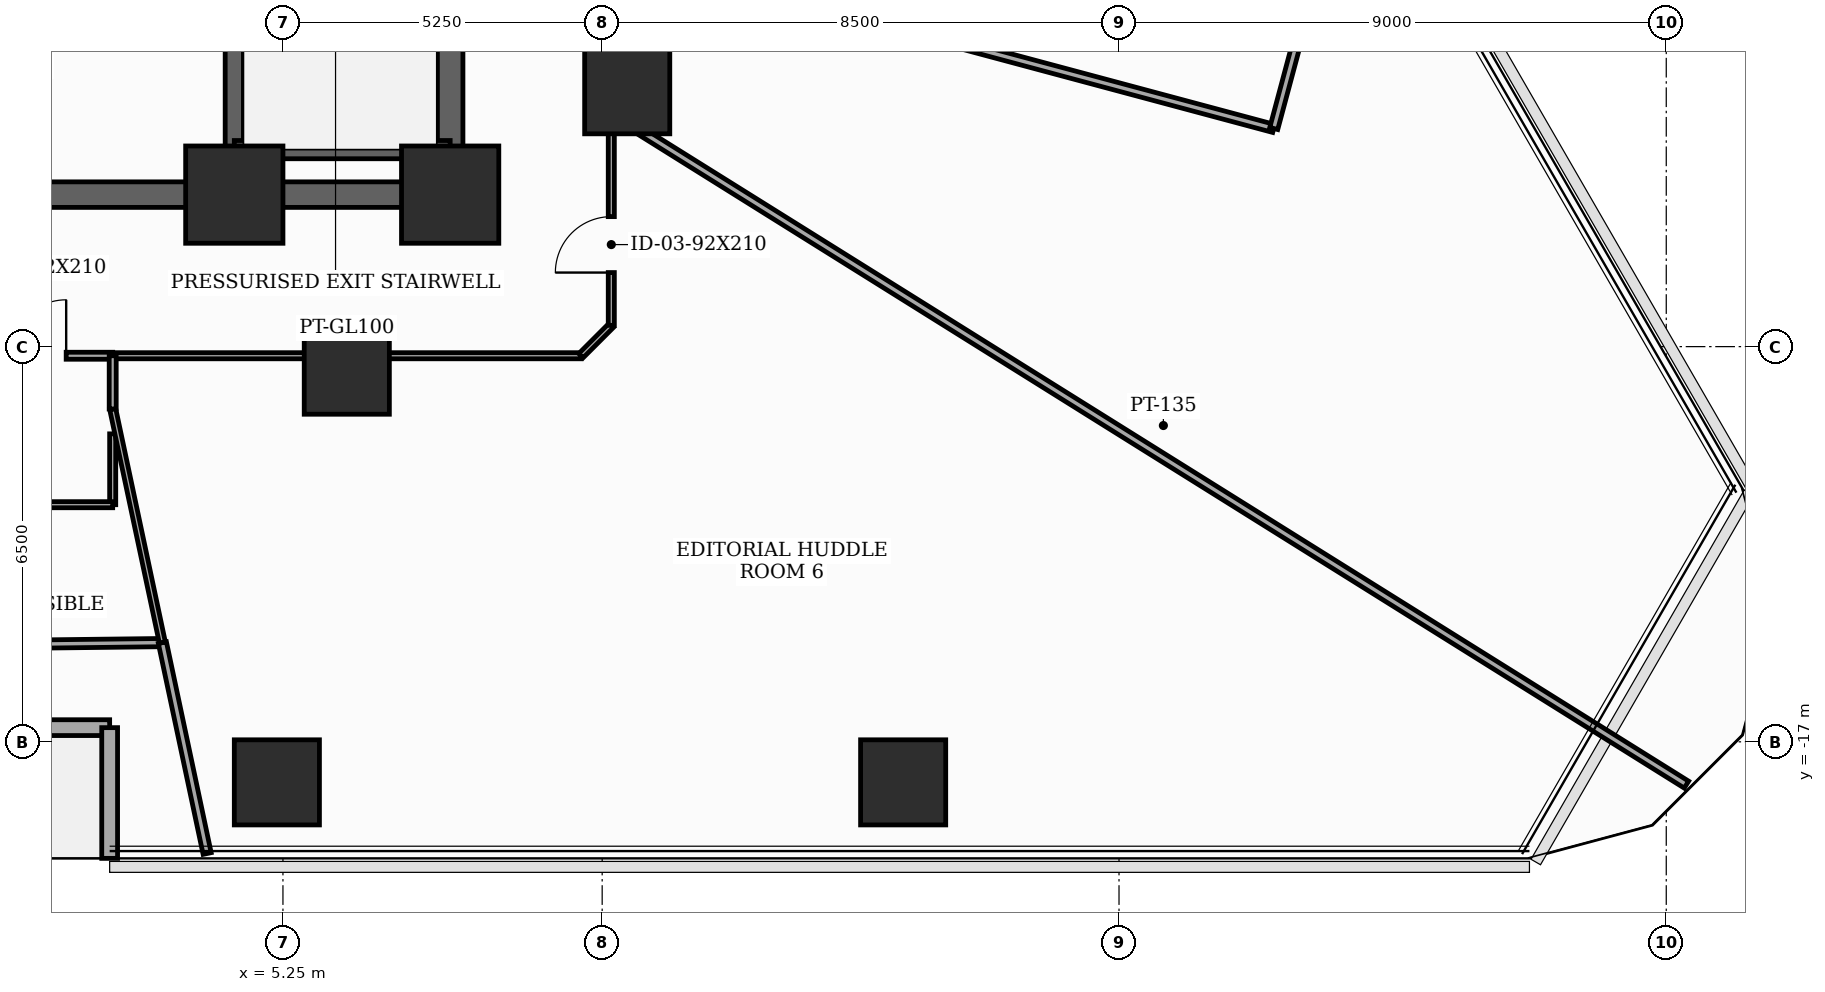
"""IFC4 building model, lengths in metres.
Left out: names, types, materials, properties, quantities, classifications, styles, units other than length and angle.
Written with IfcOpenShell. Run it as: python <this file> out.ifc"""

import sys

from ifc_helpers import new_model, si_unit, direction, frame, frame_2d, origin, origin_2d, place, context, subcontext, project, spatial, rectangle, extrude, element, fill, save


model = new_model("IFC4")
c1 = context("Model", 3, precision=1e-05, world=origin(), true_north=direction((0.0, 1.0)))
c2 = subcontext(c1, "Body", "Model", "MODEL_VIEW")
j1 = project(units=[si_unit("LENGTHUNIT", "METRE"), si_unit("PLANEANGLEUNIT", "RADIAN")], contexts=[c1])
p1 = place(None, origin())
s1 = spatial("IfcSite", under=j1, at=p1, CompositionType="ELEMENT")
p2 = place(p1, origin())
s2 = spatial("IfcBuilding", under=s1, at=p2, CompositionType="ELEMENT")
p3 = place(p2, frame((0.0, 0.0, 29.7)))
s3 = spatial("IfcBuildingStorey", under=s2, at=p3, CompositionType="ELEMENT", Elevation=29.7)
for number, where, z_axis, x_axis in (
    (1, (4.45, -8.0, 0.0), (0.0, 0.0, 1.0), (1.0, 0.0, 0.0)),
    (2, (8.0, -8.0, 0.0), (0.0, 0.0, 1.0), (1.0, 0.0, 0.0)),
):
    element("IfcColumn", number, at=place(p3, frame(where, z_axis=z_axis, x_axis=x_axis)), inside=s3, PredefinedType="COLUMN", context=c2, shape_type="SweptSolid", body=[
        extrude(rectangle(XDim=1.6, YDim=1.6, at=origin_2d()), origin(), (0.0, 0.0, 1.0), 3.7),
    ])
for number, where, z_axis, x_axis in (
    (3, (6.3, -10.912, 0.0), (0.0, 0.0, 1.0), (1.0, 0.0, 0.0)),
    (4, (10.912, -6.3, 0.0), (0.0, 0.0, 1.0), (1.0, 0.0, 0.0)),
    (5, (5.15, -17.667, 0.0), (0.0, 0.0, 1.0), (1.0, 0.0, 0.0)),
    (6, (15.45, -17.667, 0.0), (0.0, 0.0, 1.0), (1.0, 0.0, 0.0)),
):
    element("IfcColumn", number, at=place(p3, frame(where, z_axis=z_axis, x_axis=x_axis)), inside=s3, PredefinedType="COLUMN", context=c2, shape_type="SweptSolid", body=[
        extrude(rectangle(XDim=1.4, YDim=1.4, at=origin_2d()), origin(), (0.0, 0.0, 1.0), 3.7),
    ])
p4 = place(p3, frame((-8.4, -16.767, 0.0), z_axis=(0.0, 0.0, 1.0), x_axis=(1.0, 0.0, 0.0)))
e7 = element("IfcWall", 7, at=p4, inside=s3, PredefinedType="SOLIDWALL", context=c2, shape_type="SweptSolid", body=[
    extrude(rectangle(XDim=10.8, YDim=0.26, at=frame_2d((5.4, 0.0))), origin(), (0.0, 0.0, 1.0), 3.5),
])
p5 = place(p4, frame((7.2, 0.0, 0.0)))
e8 = element("IfcOpeningElement", 8, at=p5, cuts=e7, PredefinedType="OPENING", context=c2, shape_type="SweptSolid", body=[
    extrude(rectangle(XDim=1.6, YDim=2.08, at=frame_2d((0.8, 1.04))), frame((0.0, 0.14, 0.0), z_axis=(0.0, -1.0, 0.0), x_axis=(1.0, 0.0, 0.0)), (0.0, 0.0, 1.0), 0.28),
])
p6 = place(p4, frame((5.65, 0.0, 0.85)))
e9 = element("IfcOpeningElement", 9, at=p6, cuts=e7, PredefinedType="OPENING", context=c2, shape_type="SweptSolid", body=[
    extrude(rectangle(XDim=1.3, YDim=1.25, at=frame_2d((0.65, 0.625))), frame((0.0, 0.14, 0.0), z_axis=(0.0, -1.0, 0.0), x_axis=(1.0, 0.0, 0.0)), (0.0, 0.0, 1.0), 0.28),
])
p7 = place(p3, frame((2.4, -16.767, 0.0), z_axis=(0.0, 0.0, 1.0), x_axis=(0.0, -1.0, 0.0)))
e10 = element("IfcWall", 10, at=p7, inside=s3, PredefinedType="SOLIDWALL", context=c2, shape_type="SweptSolid", body=[
    extrude(rectangle(XDim=2.15, YDim=0.26, at=frame_2d((1.075, 0.0))), origin(), (0.0, 0.0, 1.0), 3.5),
])
p8 = place(p3, frame((8.0, -8.0, 0.0), z_axis=(0.0, 0.0, 1.0), x_axis=(0.0, 1.0, 0.0)))
e11 = element("IfcWall", 11, at=p8, inside=s3, PredefinedType="SHEAR", context=c2, shape_type="SweptSolid", body=[
    extrude(rectangle(XDim=16.0, YDim=0.42, at=frame_2d((8.0, 0.0))), origin(), (0.0, 0.0, 1.0), 3.5),
])
p9 = place(p8, frame((9.6, 0.0, 0.0)))
e12 = element("IfcOpeningElement", 12, at=p9, cuts=e11, PredefinedType="OPENING", context=c2, shape_type="SweptSolid", body=[
    extrude(rectangle(XDim=1.05, YDim=2.15, at=frame_2d((0.525, 1.075))), frame((0.0, 0.22, 0.0), z_axis=(0.0, -1.0, 0.0), x_axis=(1.0, 0.0, 0.0)), (0.0, 0.0, 1.0), 0.44),
])
p10 = place(p8, frame((14.148, 0.0, 0.0)))
e13 = element("IfcOpeningElement", 13, at=p10, cuts=e11, PredefinedType="OPENING", context=c2, shape_type="SweptSolid", body=[
    extrude(rectangle(XDim=0.85, YDim=2.02, at=frame_2d((0.425, 1.01))), frame((0.0, 0.22, 0.0), z_axis=(0.0, -1.0, 0.0), x_axis=(1.0, 0.0, 0.0)), (0.0, 0.0, 1.0), 0.44),
])
p11 = place(p3, frame((-8.0, -8.0, 0.0), z_axis=(0.0, 0.0, 1.0), x_axis=(1.0, 0.0, 0.0)))
e14 = element("IfcWall", 14, at=p11, inside=s3, PredefinedType="SHEAR", context=c2, shape_type="SweptSolid", body=[
    extrude(rectangle(XDim=16.0, YDim=0.42, at=frame_2d((8.0, 0.0))), origin(), (0.0, 0.0, 1.0), 3.5),
])
p12 = place(p11, frame((7.52, 0.0, 0.0)))
e15 = element("IfcOpeningElement", 15, at=p12, cuts=e14, PredefinedType="OPENING", context=c2, shape_type="SweptSolid", body=[
    extrude(rectangle(XDim=0.95, YDim=2.1, at=frame_2d((0.475, 1.05))), frame((0.0, 0.22, 0.0), z_axis=(0.0, -1.0, 0.0), x_axis=(1.0, 0.0, 0.0)), (0.0, 0.0, 1.0), 0.44),
])
p13 = place(p3, frame((4.45, -7.79, 0.0), z_axis=(0.0, 0.0, 1.0), x_axis=(0.0, 1.0, 0.0)))
e16 = element("IfcWall", 16, at=p13, inside=s3, PredefinedType="SHEAR", context=c2, shape_type="SweptSolid", body=[
    extrude(rectangle(XDim=15.58, YDim=0.3, at=frame_2d((7.79, 0.0))), origin(), (0.0, 0.0, 1.0), 3.5),
])
p14 = place(p3, frame((4.45, -7.26, 0.0), z_axis=(0.0, 0.0, 1.0), x_axis=(1.0, 0.0, 0.0)))
e17 = element("IfcWall", 17, at=p14, inside=s3, PredefinedType="SHEAR", context=c2, shape_type="SweptSolid", body=[
    extrude(rectangle(XDim=3.55, YDim=0.3, at=frame_2d((1.775, 0.0))), origin(), (0.0, 0.0, 1.0), 3.5),
])
p15 = place(p3, frame((10.65, -6.655, 0.0), z_axis=(0.0, 0.0, 1.0), x_axis=(0.0, 1.0, 0.0)))
e18 = element("IfcWall", 18, at=p15, inside=s3, PredefinedType="PARTITIONING", context=c2, shape_type="SweptSolid", body=[
    extrude(rectangle(XDim=2.663, YDim=0.135, at=frame_2d((1.332, 0.0))), origin(), (0.0, 0.0, 1.0), 2.785),
])
p16 = place(p3, frame((10.65, -3.992, 0.0), z_axis=(0.0, 0.0, 1.0), x_axis=(0.965906888357, -0.258889712088, 0.0)))
e19 = element("IfcWall", 19, at=p16, inside=s3, PredefinedType="PARTITIONING", context=c2, shape_type="SweptSolid", body=[
    extrude(rectangle(XDim=11.28, YDim=0.135, at=frame_2d((5.64, 0.0))), origin(), (0.0, 0.0, 1.0), 2.785),
])
p17 = place(p3, frame((21.545, -6.912, 0.0), z_axis=(0.0, 0.0, 1.0), x_axis=(0.259105843213, 0.965848933329, 0.0)))
e20 = element("IfcWall", 20, at=p17, inside=s3, PredefinedType="PARTITIONING", context=c2, shape_type="SweptSolid", body=[
    extrude(rectangle(XDim=2.2, YDim=0.135, at=frame_2d((1.1, 0.0))), origin(), (0.0, 0.0, 1.0), 2.935),
])
p18 = place(p3, frame((0.0, -10.65, 0.0), z_axis=(0.0, 0.0, 1.0), x_axis=(1.0, 0.0, 0.0)))
e21 = element("IfcWall", 21, at=p18, inside=s3, PredefinedType="PARTITIONING", context=c2, shape_type="SweptSolid", body=[
    extrude(rectangle(XDim=2.45, YDim=0.115, at=frame_2d((1.225, 0.0))), origin(), (0.0, 0.0, 1.0), 3.5),
])
p19 = place(p18, frame((0.765, 0.0, 0.0)))
e22 = element("IfcOpeningElement", 22, at=p19, cuts=e21, PredefinedType="OPENING", context=c2, shape_type="SweptSolid", body=[
    extrude(rectangle(XDim=0.92, YDim=2.1, at=frame_2d((0.46, 1.05))), frame((0.0, 0.067, 0.0), z_axis=(0.0, -1.0, 0.0), x_axis=(1.0, 0.0, 0.0)), (0.0, 0.0, 1.0), 0.135),
])
p20 = place(p3, frame((2.45, -10.65, 0.0), z_axis=(0.0, 0.0, 1.0), x_axis=(1.0, 0.0, 0.0)))
e23 = element("IfcWall", 23, at=p20, inside=s3, PredefinedType="MOVABLE", context=c2, shape_type="SweptSolid", body=[
    extrude(rectangle(XDim=7.7, YDim=0.1, at=frame_2d((3.85, 0.0))), origin(), (0.0, 0.0, 1.0), 2.785),
])
p21 = place(p3, frame((10.15, -10.65, 0.0), z_axis=(0.0, 0.0, 1.0), x_axis=(0.707106781187, 0.707106781187, 0.0)))
e24 = element("IfcWall", 24, at=p21, inside=s3, PredefinedType="MOVABLE", context=c2, shape_type="SweptSolid", body=[
    extrude(rectangle(XDim=0.707, YDim=0.1, at=frame_2d((0.354, 0.0))), origin(), (0.0, 0.0, 1.0), 3.5),
])
p22 = place(p3, frame((10.65, -10.15, 0.0), z_axis=(0.0, 0.0, 1.0), x_axis=(0.0, 1.0, 0.0)))
e25 = element("IfcWall", 25, at=p22, inside=s3, PredefinedType="MOVABLE", context=c2, shape_type="SweptSolid", body=[
    extrude(rectangle(XDim=3.495, YDim=0.1, at=frame_2d((1.748, 0.0))), origin(), (0.0, 0.0, 1.0), 2.785),
])
p23 = place(p22, frame((0.868, 0.0, 0.0)))
e26 = element("IfcOpeningElement", 26, at=p23, cuts=e25, PredefinedType="OPENING", context=c2, shape_type="SweptSolid", body=[
    extrude(rectangle(XDim=0.92, YDim=2.1, at=frame_2d((0.46, 1.05))), frame((0.0, 0.06, 0.0), z_axis=(0.0, -1.0, 0.0), x_axis=(1.0, 0.0, 0.0)), (0.0, 0.0, 1.0), 0.12),
])
p24 = place(p3, frame((10.65, -6.655, 0.0), z_axis=(0.0, 0.0, 1.0), x_axis=(0.848052240981, -0.529912631069, 0.0)))
e27 = element("IfcWall", 27, at=p24, inside=s3, PredefinedType="PARTITIONING", context=c2, shape_type="SweptSolid", body=[
    extrude(rectangle(XDim=20.85, YDim=0.135, at=frame_2d((10.425, 0.0))), origin(), (0.0, 0.0, 1.0), 2.785),
])
p25 = place(p3, frame((3.267, -15.368, 0.0), z_axis=(0.0, 0.0, 1.0), x_axis=(-0.999931630146, -0.011693375588, 0.0)))
e28 = element("IfcWall", 28, at=p25, inside=s3, PredefinedType="PARTITIONING", context=c2, shape_type="SweptSolid", body=[
    extrude(rectangle(XDim=6.598, YDim=0.135, at=frame_2d((3.299, 0.0))), origin(), (0.0, 0.0, 1.0), 3.5),
])
p26 = place(p3, frame((4.003, -18.837, 0.0), z_axis=(0.0, 0.0, 1.0), x_axis=(-0.207633969896, 0.978206590933, 0.0)))
e29 = element("IfcWall", 29, at=p26, inside=s3, PredefinedType="PARTITIONING", context=c2, shape_type="SweptSolid", body=[
    extrude(rectangle(XDim=3.546, YDim=0.135, at=frame_2d((1.773, 0.0))), origin(), (0.0, 0.0, 1.0), 2.935),
])
p27 = place(p3, frame((2.45, -11.935, 0.0), z_axis=(0.0, 0.0, 1.0), x_axis=(0.0, -1.0, 0.0)))
e30 = element("IfcWall", 30, at=p27, inside=s3, PredefinedType="MOVABLE", context=c2, shape_type="SweptSolid", body=[
    extrude(rectangle(XDim=1.166, YDim=0.1, at=frame_2d((0.583, 0.0))), origin(), (0.0, 0.0, 1.0), 2.785),
])
p28 = place(p3, frame((2.45, -13.1, 0.0), z_axis=(0.0, 0.0, 1.0), x_axis=(-1.0, 0.0, 0.0)))
e31 = element("IfcWall", 31, at=p28, inside=s3, PredefinedType="MOVABLE", context=c2, shape_type="SweptSolid", body=[
    extrude(rectangle(XDim=2.45, YDim=0.1, at=frame_2d((1.225, 0.0))), origin(), (0.0, 0.0, 1.0), 3.5),
])
p29 = place(p3, frame((3.267, -15.368, 0.0), z_axis=(0.0, 0.0, 1.0), x_axis=(-0.208030469109, 0.978122346091, 0.0)))
e32 = element("IfcWall", 32, at=p29, inside=s3, PredefinedType="MOVABLE", context=c2, shape_type="SweptSolid", body=[
    extrude(rectangle(XDim=3.928, YDim=0.1, at=frame_2d((1.964, 0.0))), origin(), (0.0, 0.0, 1.0), 2.785),
])
p30 = place(p3, frame((2.45, -11.526, 0.0), z_axis=(0.0, 0.0, 1.0), x_axis=(0.0, 1.0, 0.0)))
e33 = element("IfcWall", 33, at=p30, inside=s3, PredefinedType="PARTITIONING", context=c2, shape_type="SweptSolid", body=[
    extrude(rectangle(XDim=0.876, YDim=0.115, at=frame_2d((0.438, 0.0))), origin(), (0.0, 0.0, 1.0), 3.5),
])
p31 = place(p19, origin())
e34 = element("IfcDoor", 34, at=p31, inside=s3, OperationType="SINGLE_SWING_RIGHT", PredefinedType="DOOR", context=c2, shape_type="SweptSolid", body=[
    extrude(rectangle(XDim=0.92, YDim=2.1, at=frame_2d((0.46, 1.05))), frame((0.0, 0.025, 0.0), z_axis=(0.0, -1.0, 0.0), x_axis=(1.0, 0.0, 0.0)), (0.0, 0.0, 1.0), 0.05),
])
fill(e22, e34)
p32 = place(p23, origin())
e35 = element("IfcDoor", 35, at=p32, inside=s3, OperationType="SINGLE_SWING_LEFT", PredefinedType="DOOR", context=c2, shape_type="SweptSolid", body=[
    extrude(rectangle(XDim=0.92, YDim=2.1, at=frame_2d((0.46, 1.05))), frame((0.0, 0.025, 0.0), z_axis=(0.0, -1.0, 0.0), x_axis=(1.0, 0.0, 0.0)), (0.0, 0.0, 1.0), 0.05),
])
fill(e26, e35)
save(model, sys.argv[1])
